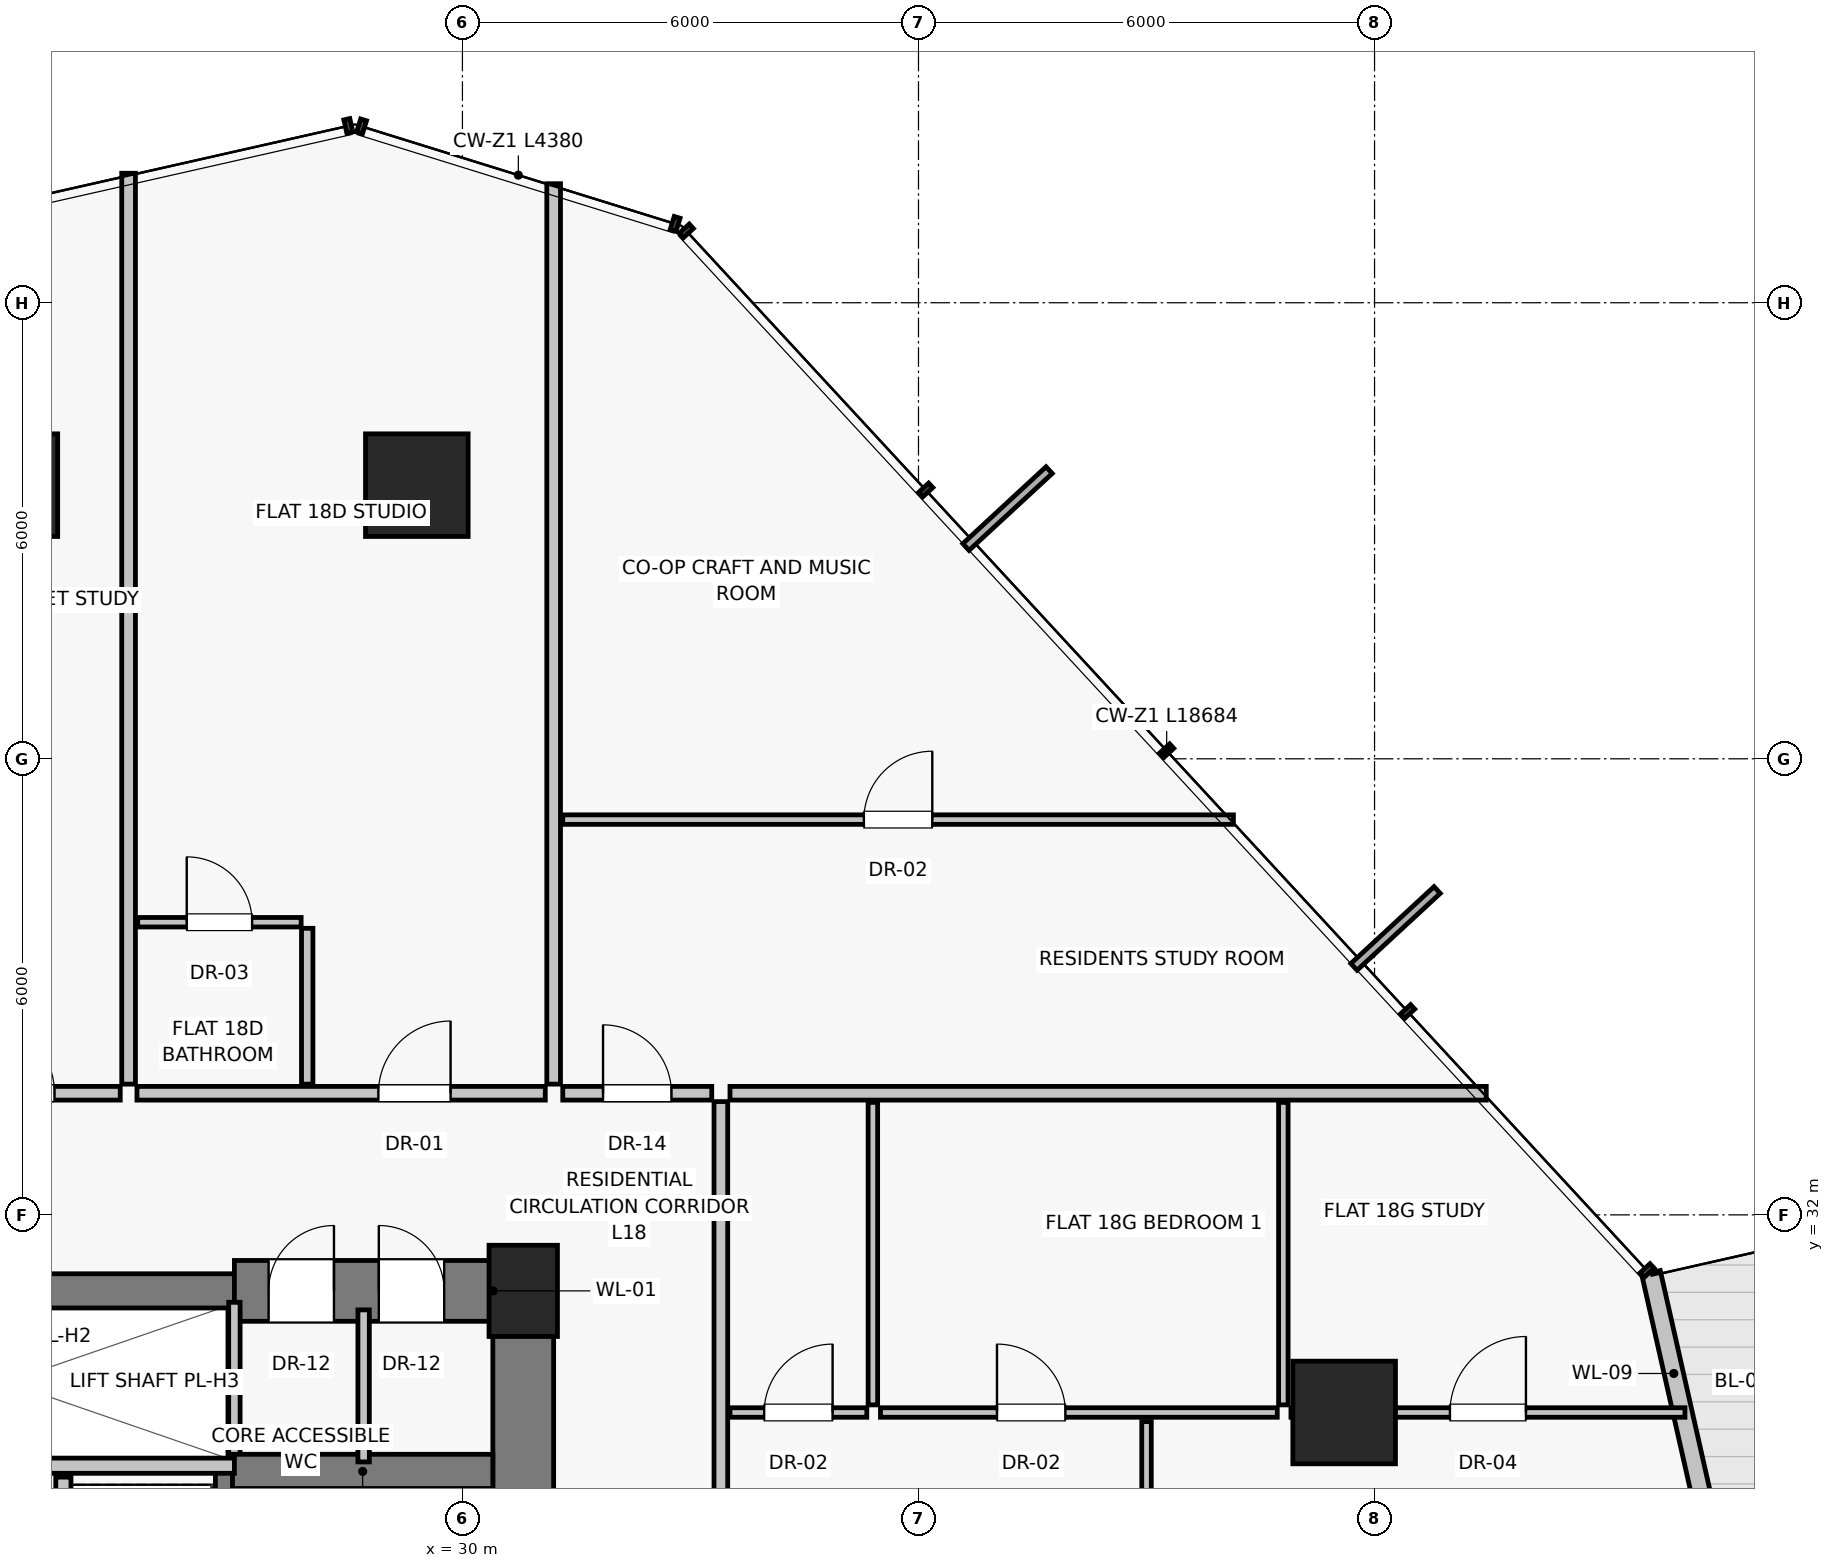
"""IFC4 building model, lengths in metres.
Left out: names, types, materials, properties, quantities, classifications, styles, units other than length and angle.
Written with IfcOpenShell. Run it as: python <this file> out.ifc"""

import sys

from ifc_helpers import new_model, si_unit, direction, frame, frame_2d, origin, origin_2d, place, context, subcontext, project, spatial, rectangle, extrude, source, transform, mapped, element, fill, save


model = new_model("IFC4")
c1 = context("Model", 3, precision=1e-05, world=origin(), true_north=direction((0.0, 1.0)))
c2 = subcontext(c1, "Body", "Model", "MODEL_VIEW")
j1 = project(units=[si_unit("LENGTHUNIT", "METRE"), si_unit("PLANEANGLEUNIT", "RADIAN")], contexts=[c1])
p1 = place(None, origin())
s1 = spatial("IfcSite", under=j1, at=p1, CompositionType="ELEMENT")
p2 = place(p1, origin())
s2 = spatial("IfcBuilding", under=s1, at=p2, CompositionType="ELEMENT")
p3 = place(p2, frame((0.0, 0.0, 67.35)))
s3 = spatial("IfcBuildingStorey", under=s2, at=p3, CompositionType="ELEMENT", Elevation=67.35)
p4 = place(p3, frame((30.8, 31.0, 0.0), z_axis=(0.0, 0.0, 1.0), x_axis=(1.0, 0.0, 0.0)))
e1 = element("IfcColumn", 1, at=p4, inside=s3, PredefinedType="PILASTER", context=c2, shape_type="SweptSolid", body=[
    extrude(rectangle(XDim=0.9, YDim=1.2, at=origin_2d()), origin(), (0.0, 0.0, 1.0), 3.25),
])
for number, where, z_axis, x_axis in (
    (2, (41.6, 29.4, 0.0), (0.0, 0.0, 1.0), (1.0, 0.0, 0.0)),
    (3, (29.4, 41.6, 0.0), (0.0, 0.0, 1.0), (1.0, 0.0, 0.0)),
    (4, (24.0, 41.6, 0.0), (0.0, 0.0, 1.0), (1.0, 0.0, 0.0)),
):
    element("IfcColumn", number, at=place(p3, frame(where, z_axis=z_axis, x_axis=x_axis)), inside=s3, PredefinedType="COLUMN", context=c2, shape_type="SweptSolid", body=[
        extrude(rectangle(XDim=1.35, YDim=1.35, at=origin_2d()), origin(), (0.0, 0.0, 1.0), 3.25),
    ])
p5 = place(p3, frame((46.647, 26.773, 0.0), z_axis=(0.0, 0.0, 1.0), x_axis=(-0.220535742642, 0.97537889367, 0.0)))
e5 = element("IfcWall", 5, at=p5, inside=s3, PredefinedType="SOLIDWALL", context=c2, shape_type="SweptSolid", body=[
    extrude(rectangle(XDim=4.58, YDim=0.25, at=frame_2d((2.29, 0.0))), origin(), (0.0, 0.0, 1.0), 3.0),
])
p6 = place(p5, frame((0.46, 0.0, 0.0)))
e6 = element("IfcOpeningElement", 6, at=p6, cuts=e5, PredefinedType="OPENING", context=c2, shape_type="SweptSolid", body=[
    extrude(rectangle(XDim=1.15, YDim=2.25, at=frame_2d((0.575, 1.125))), frame((0.0, 0.135, 0.0), z_axis=(0.0, -1.0, 0.0), x_axis=(1.0, 0.0, 0.0)), (0.0, 0.0, 1.0), 0.27),
])
p7 = place(p3, frame((30.8, 16.8, 0.0), z_axis=(0.0, 0.0, 1.0), x_axis=(0.0, 1.0, 0.0)))
e7 = element("IfcWall", 7, at=p7, inside=s3, PredefinedType="SHEAR", context=c2, shape_type="SweptSolid", body=[
    extrude(rectangle(XDim=14.2, YDim=0.8, at=frame_2d((7.1, 0.0))), origin(), (0.0, 0.0, 1.0), 3.0),
])
p8 = place(p3, frame((21.0, 31.0, 0.0), z_axis=(0.0, 0.0, 1.0), x_axis=(1.0, 0.0, 0.0)))
e8 = element("IfcWall", 8, at=p8, inside=s3, PredefinedType="SHEAR", context=c2, shape_type="SweptSolid", body=[
    extrude(rectangle(XDim=6.0, YDim=0.45, at=frame_2d((3.0, 0.0))), origin(), (0.0, 0.0, 1.0), 3.0),
])
p9 = place(p3, frame((27.0, 31.0, 0.0), z_axis=(0.0, 0.0, 1.0), x_axis=(1.0, 0.0, 0.0)))
e9 = element("IfcWall", 9, at=p9, inside=s3, PredefinedType="SHEAR", context=c2, shape_type="SweptSolid", body=[
    extrude(rectangle(XDim=3.8, YDim=0.8, at=frame_2d((1.9, 0.0))), origin(), (0.0, 0.0, 1.0), 3.0),
])
p10 = place(p9, frame((0.45, 0.0, 0.0)))
e10 = element("IfcOpeningElement", 10, at=p10, cuts=e9, PredefinedType="OPENING", context=c2, shape_type="SweptSolid", body=[
    extrude(rectangle(XDim=0.86, YDim=2.01, at=frame_2d((0.43, 1.005))), frame((0.0, 0.41, 0.0), z_axis=(0.0, -1.0, 0.0), x_axis=(1.0, 0.0, 0.0)), (0.0, 0.0, 1.0), 0.82),
])
p11 = place(p9, frame((1.9, 0.0, 0.0)))
e11 = element("IfcOpeningElement", 11, at=p11, cuts=e9, PredefinedType="OPENING", context=c2, shape_type="SweptSolid", body=[
    extrude(rectangle(XDim=0.86, YDim=2.01, at=frame_2d((0.43, 1.005))), frame((0.0, 0.41, 0.0), z_axis=(0.0, -1.0, 0.0), x_axis=(1.0, 0.0, 0.0)), (0.0, 0.0, 1.0), 0.82),
])
p12 = place(p3, frame((27.0, 28.65, 0.0), z_axis=(0.0, 0.0, 1.0), x_axis=(0.0, 1.0, 0.0)))
e12 = element("IfcWall", 12, at=p12, inside=s3, PredefinedType="PARTITIONING", context=c2, shape_type="SweptSolid", body=[
    extrude(rectangle(XDim=2.2, YDim=0.15, at=frame_2d((1.1, 0.0))), origin(), (0.0, 0.0, 1.0), 3.0),
])
p13 = place(p3, frame((26.975, 19.8, 0.0), z_axis=(0.0, 0.0, 1.0), x_axis=(0.0, 1.0, 0.0)))
e13 = element("IfcWall", 13, at=p13, inside=s3, PredefinedType="SHEAR", context=c2, shape_type="SweptSolid", body=[
    extrude(rectangle(XDim=8.825, YDim=0.45, at=frame_2d((4.413, 0.0))), origin(), (0.0, 0.0, 1.0), 3.0),
])
p14 = place(p3, frame((26.975, 28.625, 0.0), z_axis=(0.0, 0.0, 1.0), x_axis=(1.0, 0.0, 0.0)))
e14 = element("IfcWall", 14, at=p14, inside=s3, PredefinedType="SHEAR", context=c2, shape_type="SweptSolid", body=[
    extrude(rectangle(XDim=3.425, YDim=0.45, at=frame_2d((1.712, 0.0))), origin(), (0.0, 0.0, 1.0), 3.0),
])
p15 = place(p3, frame((21.0, 28.7, 0.0), z_axis=(0.0, 0.0, 1.0), x_axis=(1.0, 0.0, 0.0)))
e15 = element("IfcWall", 15, at=p15, inside=s3, PredefinedType="SOLIDWALL", context=c2, shape_type="SweptSolid", body=[
    extrude(rectangle(XDim=6.0, YDim=0.2, at=frame_2d((3.0, 0.0))), origin(), (0.0, 0.0, 1.0), 3.0),
])
p16 = place(p3, frame((24.75, 22.6, 0.0), z_axis=(0.0, 0.0, 1.0), x_axis=(0.0, 1.0, 0.0)))
e16 = element("IfcWall", 16, at=p16, inside=s3, PredefinedType="SOLIDWALL", context=c2, shape_type="SweptSolid", body=[
    extrude(rectangle(XDim=5.95, YDim=0.2, at=frame_2d((2.975, 0.0))), origin(), (0.0, 0.0, 1.0), 3.0),
])
p17 = place(p3, frame((28.7, 28.75, 0.0), z_axis=(0.0, 0.0, 1.0), x_axis=(0.0, 1.0, 0.0)))
e17 = element("IfcWall", 17, at=p17, inside=s3, PredefinedType="PARTITIONING", context=c2, shape_type="SweptSolid", body=[
    extrude(rectangle(XDim=2.0, YDim=0.15, at=frame_2d((1.0, 0.0))), origin(), (0.0, 0.0, 1.0), 3.0),
])
p18 = place(p3, frame((31.2, 33.72, 0.0), z_axis=(0.0, 0.0, 1.0), x_axis=(0.0, 1.0, 0.0)))
e18 = element("IfcWall", 18, at=p18, inside=s3, PredefinedType="PARTITIONING", context=c2, shape_type="SweptSolid", body=[
    extrude(rectangle(XDim=11.846, YDim=0.18, at=frame_2d((5.923, 0.0))), origin(), (0.0, 0.0, 1.0), 3.0),
])
p19 = place(p3, frame((22.768, 33.6, 0.0), z_axis=(0.0, 0.0, 1.0), x_axis=(1.0, 0.0, 0.0)))
e19 = element("IfcWall", 19, at=p19, inside=s3, PredefinedType="PARTITIONING", context=c2, shape_type="SweptSolid", body=[
    extrude(rectangle(XDim=2.73, YDim=0.18, at=frame_2d((1.365, 0.0))), origin(), (0.0, 0.0, 1.0), 3.0),
])
p20 = place(p19, frame((0.865, 0.0, 0.0)))
e20 = element("IfcOpeningElement", 20, at=p20, cuts=e19, PredefinedType="OPENING", context=c2, shape_type="SweptSolid", body=[
    extrude(rectangle(XDim=1.0, YDim=2.01, at=frame_2d((0.5, 1.005))), frame((0.0, 0.1, 0.0), z_axis=(0.0, -1.0, 0.0), x_axis=(1.0, 0.0, 0.0)), (0.0, 0.0, 1.0), 0.2),
])
p21 = place(p3, frame((25.608, 33.72, 0.0), z_axis=(0.0, 0.0, 1.0), x_axis=(0.0, 1.0, 0.0)))
e21 = element("IfcWall", 21, at=p21, inside=s3, PredefinedType="PARTITIONING", context=c2, shape_type="SweptSolid", body=[
    extrude(rectangle(XDim=11.984, YDim=0.18, at=frame_2d((5.992, 0.0))), origin(), (0.0, 0.0, 1.0), 3.0),
])
p22 = place(p3, frame((25.718, 33.6, 0.0), z_axis=(0.0, 0.0, 1.0), x_axis=(1.0, 0.0, 0.0)))
e22 = element("IfcWall", 22, at=p22, inside=s3, PredefinedType="PARTITIONING", context=c2, shape_type="SweptSolid", body=[
    extrude(rectangle(XDim=5.372, YDim=0.18, at=frame_2d((2.686, 0.0))), origin(), (0.0, 0.0, 1.0), 3.0),
])
p23 = place(p22, frame((3.176, 0.0, 0.0)))
e23 = element("IfcOpeningElement", 23, at=p23, cuts=e22, PredefinedType="OPENING", context=c2, shape_type="SweptSolid", body=[
    extrude(rectangle(XDim=0.95, YDim=2.02, at=frame_2d((0.475, 1.01))), frame((0.0, 0.1, 0.0), z_axis=(0.0, -1.0, 0.0), x_axis=(1.0, 0.0, 0.0)), (0.0, 0.0, 1.0), 0.2),
])
p24 = place(p3, frame((27.958, 33.72, 0.0), z_axis=(0.0, 0.0, 1.0), x_axis=(0.0, 1.0, 0.0)))
e24 = element("IfcWall", 24, at=p24, inside=s3, PredefinedType="PARTITIONING", context=c2, shape_type="SweptSolid", body=[
    extrude(rectangle(XDim=2.05, YDim=0.15, at=frame_2d((1.025, 0.0))), origin(), (0.0, 0.0, 1.0), 3.0),
])
p25 = place(p3, frame((25.728, 35.85, 0.0), z_axis=(0.0, 0.0, 1.0), x_axis=(1.0, 0.0, 0.0)))
e25 = element("IfcWall", 25, at=p25, inside=s3, PredefinedType="PARTITIONING", context=c2, shape_type="SweptSolid", body=[
    extrude(rectangle(XDim=2.15, YDim=0.125, at=frame_2d((1.075, 0.0))), origin(), (0.0, 0.0, 1.0), 3.0),
])
p26 = place(p25, frame((0.645, 0.0, 0.0)))
e26 = element("IfcOpeningElement", 26, at=p26, cuts=e25, PredefinedType="OPENING", context=c2, shape_type="SweptSolid", body=[
    extrude(rectangle(XDim=0.86, YDim=2.01, at=frame_2d((0.43, 1.005))), frame((0.0, 0.073, 0.0), z_axis=(0.0, -1.0, 0.0), x_axis=(1.0, 0.0, 0.0)), (0.0, 0.0, 1.0), 0.145),
])
p27 = place(p3, frame((33.52, 33.6, 0.0), z_axis=(0.0, 0.0, 1.0), x_axis=(1.0, 0.0, 0.0)))
e27 = element("IfcWall", 27, at=p27, inside=s3, PredefinedType="PARTITIONING", context=c2, shape_type="SweptSolid", body=[
    extrude(rectangle(XDim=9.95, YDim=0.18, at=frame_2d((4.975, 0.0))), origin(), (0.0, 0.0, 1.0), 3.0),
])
p28 = place(p3, frame((33.4, 18.71, 0.0), z_axis=(0.0, 0.0, 1.0), x_axis=(0.0, 1.0, 0.0)))
e28 = element("IfcWall", 28, at=p28, inside=s3, PredefinedType="PARTITIONING", context=c2, shape_type="SweptSolid", body=[
    extrude(rectangle(XDim=14.78, YDim=0.18, at=frame_2d((7.39, 0.0))), origin(), (0.0, 0.0, 1.0), 3.0),
])
p29 = place(p28, frame((5.94, 0.0, 0.0)))
e29 = element("IfcOpeningElement", 29, at=p29, cuts=e28, PredefinedType="OPENING", context=c2, shape_type="SweptSolid", body=[
    extrude(rectangle(XDim=0.95, YDim=2.02, at=frame_2d((0.475, 1.01))), frame((0.0, 0.1, 0.0), z_axis=(0.0, -1.0, 0.0), x_axis=(1.0, 0.0, 0.0)), (0.0, 0.0, 1.0), 0.2),
])
p30 = place(p3, frame((40.8, 29.5, 0.0), z_axis=(0.0, 0.0, 1.0), x_axis=(0.0, 1.0, 0.0)))
e30 = element("IfcWall", 30, at=p30, inside=s3, PredefinedType="PARTITIONING", context=c2, shape_type="SweptSolid", body=[
    extrude(rectangle(XDim=3.98, YDim=0.125, at=frame_2d((1.99, 0.0))), origin(), (0.0, 0.0, 1.0), 3.0),
])
p31 = place(p3, frame((40.9, 29.4, 0.0), z_axis=(0.0, 0.0, 1.0), x_axis=(1.0, 0.0, 0.0)))
e31 = element("IfcWall", 31, at=p31, inside=s3, PredefinedType="PARTITIONING", context=c2, shape_type="SweptSolid", body=[
    extrude(rectangle(XDim=5.184, YDim=0.125, at=frame_2d((2.592, 0.0))), origin(), (0.0, 0.0, 1.0), 2.299),
])
p32 = place(p31, frame((2.092, 0.0, 0.0)))
e32 = element("IfcOpeningElement", 32, at=p32, cuts=e31, PredefinedType="OPENING", context=c2, shape_type="SweptSolid", body=[
    extrude(rectangle(XDim=1.0, YDim=2.01, at=frame_2d((0.5, 1.005))), frame((0.0, 0.073, 0.0), z_axis=(0.0, -1.0, 0.0), x_axis=(1.0, 0.0, 0.0)), (0.0, 0.0, 1.0), 0.145),
])
p33 = place(p3, frame((39.0, 18.72, 0.0), z_axis=(0.0, 0.0, 1.0), x_axis=(0.0, 1.0, 0.0)))
e33 = element("IfcWall", 33, at=p33, inside=s3, PredefinedType="PARTITIONING", context=c2, shape_type="SweptSolid", body=[
    extrude(rectangle(XDim=10.56, YDim=0.125, at=frame_2d((5.28, 0.0))), origin(), (0.0, 0.0, 1.0), 3.0),
])
p34 = place(p33, frame((4.78, 0.0, 0.0)))
e34 = element("IfcOpeningElement", 34, at=p34, cuts=e33, PredefinedType="OPENING", context=c2, shape_type="SweptSolid", body=[
    extrude(rectangle(XDim=1.0, YDim=2.01, at=frame_2d((0.5, 1.005))), frame((0.0, 0.073, 0.0), z_axis=(0.0, -1.0, 0.0), x_axis=(1.0, 0.0, 0.0)), (0.0, 0.0, 1.0), 0.145),
])
p35 = place(p3, frame((33.52, 29.4, 0.0), z_axis=(0.0, 0.0, 1.0), x_axis=(1.0, 0.0, 0.0)))
e35 = element("IfcWall", 35, at=p35, inside=s3, PredefinedType="PARTITIONING", context=c2, shape_type="SweptSolid", body=[
    extrude(rectangle(XDim=1.8, YDim=0.125, at=frame_2d((0.9, 0.0))), origin(), (0.0, 0.0, 1.0), 3.0),
])
p36 = place(p35, frame((0.45, 0.0, 0.0)))
e36 = element("IfcOpeningElement", 36, at=p36, cuts=e35, PredefinedType="OPENING", context=c2, shape_type="SweptSolid", body=[
    extrude(rectangle(XDim=0.9, YDim=2.01, at=frame_2d((0.45, 1.005))), frame((0.0, 0.073, 0.0), z_axis=(0.0, -1.0, 0.0), x_axis=(1.0, 0.0, 0.0)), (0.0, 0.0, 1.0), 0.145),
])
p37 = place(p3, frame((35.4, 29.5, 0.0), z_axis=(0.0, 0.0, 1.0), x_axis=(0.0, 1.0, 0.0)))
e37 = element("IfcWall", 37, at=p37, inside=s3, PredefinedType="PARTITIONING", context=c2, shape_type="SweptSolid", body=[
    extrude(rectangle(XDim=3.98, YDim=0.125, at=frame_2d((1.99, 0.0))), origin(), (0.0, 0.0, 1.0), 3.0),
])
p38 = place(p3, frame((35.5, 29.4, 0.0), z_axis=(0.0, 0.0, 1.0), x_axis=(1.0, 0.0, 0.0)))
e38 = element("IfcWall", 38, at=p38, inside=s3, PredefinedType="PARTITIONING", context=c2, shape_type="SweptSolid", body=[
    extrude(rectangle(XDim=5.22, YDim=0.125, at=frame_2d((2.61, 0.0))), origin(), (0.0, 0.0, 1.0), 2.299),
])
p39 = place(p38, frame((1.533, 0.0, 0.0)))
e39 = element("IfcOpeningElement", 39, at=p39, cuts=e38, PredefinedType="OPENING", context=c2, shape_type="SweptSolid", body=[
    extrude(rectangle(XDim=0.9, YDim=2.01, at=frame_2d((0.45, 1.005))), frame((0.0, 0.073, 0.0), z_axis=(0.0, -1.0, 0.0), x_axis=(1.0, 0.0, 0.0)), (0.0, 0.0, 1.0), 0.145),
])
p40 = place(p3, frame((31.32, 33.6, 0.0), z_axis=(0.0, 0.0, 1.0), x_axis=(1.0, 0.0, 0.0)))
e40 = element("IfcWall", 40, at=p40, inside=s3, PredefinedType="PARTITIONING", context=c2, shape_type="SweptSolid", body=[
    extrude(rectangle(XDim=1.96, YDim=0.18, at=frame_2d((0.98, 0.0))), origin(), (0.0, 0.0, 1.0), 3.0),
])
p41 = place(p40, frame((0.53, 0.0, 0.0)))
e41 = element("IfcOpeningElement", 41, at=p41, cuts=e40, PredefinedType="OPENING", context=c2, shape_type="SweptSolid", body=[
    extrude(rectangle(XDim=0.9, YDim=2.01, at=frame_2d((0.45, 1.005))), frame((0.0, 0.1, 0.0), z_axis=(0.0, -1.0, 0.0), x_axis=(1.0, 0.0, 0.0)), (0.0, 0.0, 1.0), 0.2),
])
p42 = place(p3, frame((31.32, 37.2, 0.0), z_axis=(0.0, 0.0, 1.0), x_axis=(1.0, 0.0, 0.0)))
e42 = element("IfcWall", 42, at=p42, inside=s3, PredefinedType="PARTITIONING", context=c2, shape_type="SweptSolid", body=[
    extrude(rectangle(XDim=8.823, YDim=0.125, at=frame_2d((4.412, 0.0))), origin(), (0.0, 0.0, 1.0), 3.0),
])
p43 = place(p42, frame((3.961, 0.0, 0.0)))
e43 = element("IfcOpeningElement", 43, at=p43, cuts=e42, PredefinedType="OPENING", context=c2, shape_type="SweptSolid", body=[
    extrude(rectangle(XDim=0.9, YDim=2.01, at=frame_2d((0.45, 1.005))), frame((0.0, 0.073, 0.0), z_axis=(0.0, -1.0, 0.0), x_axis=(1.0, 0.0, 0.0)), (0.0, 0.0, 1.0), 0.145),
])
m1 = source(origin(), c2, "Body", "SweptSolid", [
    extrude(rectangle(XDim=0.86, YDim=2.01, at=frame_2d((0.43, 1.005))), frame((0.0, 0.025, 0.0), z_axis=(0.0, -1.0, 0.0), x_axis=(1.0, 0.0, 0.0)), (0.0, 0.0, 1.0), 0.05),
])
p44 = place(p10, origin())
e44 = element("IfcDoor", 44, at=p44, inside=s3, OperationType="SINGLE_SWING_RIGHT", PredefinedType="DOOR", context=c2, shape_type="MappedRepresentation", body=[
    mapped(m1, transform((0.0, 0.0, 0.0), scale=1.0)),
])
fill(e10, e44)
p45 = place(p11, origin())
e45 = element("IfcDoor", 45, at=p45, inside=s3, OperationType="SINGLE_SWING_LEFT", PredefinedType="DOOR", context=c2, shape_type="MappedRepresentation", body=[
    mapped(m1, transform((0.0, 0.0, 0.0), scale=1.0)),
])
fill(e11, e45)
m2 = source(origin(), c2, "Body", "SweptSolid", [
    extrude(rectangle(XDim=1.0, YDim=2.01, at=frame_2d((0.5, 1.005))), frame((0.0, 0.025, 0.0), z_axis=(0.0, -1.0, 0.0), x_axis=(1.0, 0.0, 0.0)), (0.0, 0.0, 1.0), 0.05),
])
p46 = place(p20, origin())
e46 = element("IfcDoor", 46, at=p46, inside=s3, OperationType="SINGLE_SWING_LEFT", PredefinedType="DOOR", context=c2, shape_type="MappedRepresentation", body=[
    mapped(m2, transform((0.0, 0.0, 0.0), scale=1.0)),
])
fill(e20, e46)
m3 = source(origin(), c2, "Body", "SweptSolid", [
    extrude(rectangle(XDim=0.95, YDim=2.02, at=frame_2d((0.475, 1.01))), frame((0.0, 0.025, 0.0), z_axis=(0.0, -1.0, 0.0), x_axis=(1.0, 0.0, 0.0)), (0.0, 0.0, 1.0), 0.05),
])
p47 = place(p23, origin())
e47 = element("IfcDoor", 47, at=p47, inside=s3, OperationType="SINGLE_SWING_RIGHT", PredefinedType="DOOR", context=c2, shape_type="MappedRepresentation", body=[
    mapped(m3, transform((0.0, 0.0, 0.0), scale=1.0)),
])
fill(e23, e47)
p48 = place(p26, origin())
e48 = element("IfcDoor", 48, at=p48, inside=s3, OperationType="SINGLE_SWING_LEFT", PredefinedType="DOOR", context=c2, shape_type="MappedRepresentation", body=[
    mapped(m1, transform((0.0, 0.0, 0.0), scale=1.0)),
])
fill(e26, e48)
p49 = place(p32, origin())
e49 = element("IfcDoor", 49, at=p49, inside=s3, OperationType="SINGLE_SWING_RIGHT", PredefinedType="DOOR", context=c2, shape_type="MappedRepresentation", body=[
    mapped(m2, transform((0.0, 0.0, 0.0), scale=1.0)),
])
fill(e32, e49)
m4 = source(origin(), c2, "Body", "SweptSolid", [
    extrude(rectangle(XDim=0.9, YDim=2.01, at=frame_2d((0.45, 1.005))), frame((0.0, 0.025, 0.0), z_axis=(0.0, -1.0, 0.0), x_axis=(1.0, 0.0, 0.0)), (0.0, 0.0, 1.0), 0.05),
])
p50 = place(p36, origin())
e50 = element("IfcDoor", 50, at=p50, inside=s3, OperationType="SINGLE_SWING_RIGHT", PredefinedType="DOOR", context=c2, shape_type="MappedRepresentation", body=[
    mapped(m4, transform((0.0, 0.0, 0.0), scale=1.0)),
])
fill(e36, e50)
p51 = place(p39, origin())
e51 = element("IfcDoor", 51, at=p51, inside=s3, OperationType="SINGLE_SWING_LEFT", PredefinedType="DOOR", context=c2, shape_type="MappedRepresentation", body=[
    mapped(m4, transform((0.0, 0.0, 0.0), scale=1.0)),
])
fill(e39, e51)
p52 = place(p41, origin())
e52 = element("IfcDoor", 52, at=p52, inside=s3, OperationType="SINGLE_SWING_LEFT", PredefinedType="DOOR", context=c2, shape_type="MappedRepresentation", body=[
    mapped(m4, transform((0.0, 0.0, 0.0), scale=1.0)),
])
fill(e41, e52)
p53 = place(p43, origin())
e53 = element("IfcDoor", 53, at=p53, inside=s3, OperationType="SINGLE_SWING_RIGHT", PredefinedType="DOOR", context=c2, shape_type="MappedRepresentation", body=[
    mapped(m4, transform((0.0, 0.0, 0.0), scale=1.0)),
])
fill(e43, e53)
save(model, sys.argv[1])
